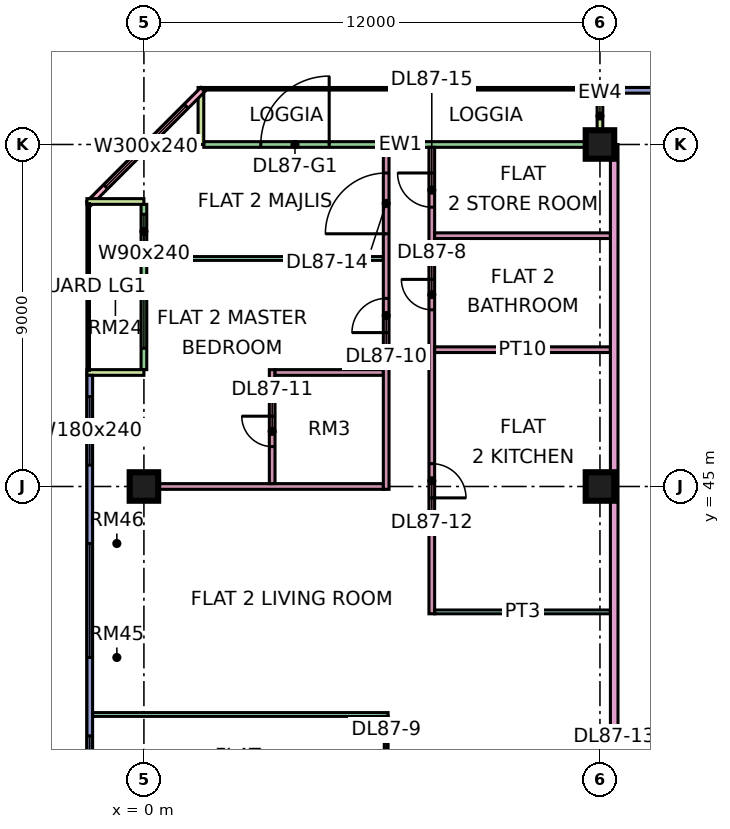
"""IFC4 building model, lengths in metres.
Left out: names, types, materials, properties, quantities, classifications, styles, units other than length and angle.
Written with IfcOpenShell. Run it as: python <this file> out.ifc"""

import sys

from ifc_helpers import new_model, si_unit, direction, frame, frame_2d, origin, origin_2d, place, context, subcontext, project, spatial, rectangle, extrude, element, fill, save


model = new_model("IFC4")
c1 = context("Model", 3, precision=1e-05, world=origin(), true_north=direction((0.0, 1.0)))
c2 = subcontext(c1, "Body", "Model", "MODEL_VIEW")
j1 = project(units=[si_unit("LENGTHUNIT", "METRE"), si_unit("PLANEANGLEUNIT", "RADIAN")], contexts=[c1])
p1 = place(None, origin())
s1 = spatial("IfcSite", under=j1, at=p1, CompositionType="ELEMENT")
p2 = place(p1, origin())
s2 = spatial("IfcBuilding", under=s1, at=p2, CompositionType="ELEMENT")
p3 = place(p2, frame((0.0, 0.0, 372.65)))
s3 = spatial("IfcBuildingStorey", under=s2, at=p3, CompositionType="ELEMENT", Elevation=372.65)
p4 = place(p3, frame((0.0, 45.0, 0.0), z_axis=(0.0, 0.0, 1.0), x_axis=(1.0, 0.0, 0.0)))
e1 = element("IfcColumn", 1, at=p4, inside=s3, PredefinedType="COLUMN", context=c2, shape_type="SweptSolid", body=[
    extrude(rectangle(XDim=0.75, YDim=0.75, at=origin_2d()), origin(), (0.0, 0.0, 1.0), 3.75),
])
for number, where, z_axis, x_axis in (
    (2, (12.0, 45.0, 0.0), (0.0, 0.0, 1.0), (1.0, 0.0, 0.0)),
    (3, (12.0, 54.0, 0.0), (0.0, 0.0, 1.0), (1.0, 0.0, 0.0)),
):
    element("IfcColumn", number, at=place(p3, frame(where, z_axis=z_axis, x_axis=x_axis)), inside=s3, PredefinedType="COLUMN", context=c2, shape_type="SweptSolid", body=[
        extrude(rectangle(XDim=0.75, YDim=0.75, at=origin_2d()), origin(), (0.0, 0.0, 1.0), 3.75),
    ])
p5 = place(p3, frame((22.5, 55.425, 0.0), z_axis=(0.0, 0.0, 1.0), x_axis=(-1.0, 0.0, 0.0)))
e4 = element("IfcWall", 4, at=p5, inside=s3, PredefinedType="SOLIDWALL", context=c2, shape_type="SweptSolid", body=[
    extrude(rectangle(XDim=10.425, YDim=0.15, at=frame_2d((5.212, 0.0))), origin(), (0.0, 0.0, 1.0), 3.35),
])
p6 = place(p5, frame((1.05, 0.0, 0.45)))
e5 = element("IfcOpeningElement", 5, at=p6, cuts=e4, PredefinedType="OPENING", context=c2, shape_type="SweptSolid", body=[
    extrude(rectangle(XDim=4.8, YDim=2.4, at=frame_2d((2.4, 1.2))), frame((0.0, 0.085, 0.0), z_axis=(0.0, -1.0, 0.0), x_axis=(1.0, 0.0, 0.0)), (0.0, 0.0, 1.0), 0.17),
])
p7 = place(p3, frame((11.925, 54.0, 0.0), z_axis=(0.0, 0.0, 1.0), x_axis=(-1.0, 0.0, 0.0)))
e6 = element("IfcWall", 6, at=p7, inside=s3, PredefinedType="SOLIDWALL", context=c2, shape_type="SweptSolid", body=[
    extrude(rectangle(XDim=10.35, YDim=0.15, at=frame_2d((5.175, 0.0))), origin(), (0.0, 0.0, 1.0), 3.35),
])
p8 = place(p7, frame((7.05, 0.0, 0.0)))
e7 = element("IfcOpeningElement", 7, at=p8, cuts=e6, PredefinedType="OPENING", context=c2, shape_type="SweptSolid", body=[
    extrude(rectangle(XDim=1.8, YDim=2.4, at=frame_2d((0.9, 1.2))), frame((0.0, 0.085, 0.0), z_axis=(0.0, -1.0, 0.0), x_axis=(1.0, 0.0, 0.0)), (0.0, 0.0, 1.0), 0.17),
])
for number, where, z_axis, x_axis in (
    (8, (12.0, 55.5, 0.0), (0.0, 0.0, 1.0), (0.0, -1.0, 0.0)),
    (9, (1.5, 55.5, 0.0), (0.0, 0.0, 1.0), (0.0, -1.0, 0.0)),
):
    element("IfcWall", number, at=place(p3, frame(where, z_axis=z_axis, x_axis=x_axis)), inside=s3, PredefinedType="SOLIDWALL", context=c2, shape_type="SweptSolid", body=[
        extrude(rectangle(XDim=1.5, YDim=0.15, at=frame_2d((0.75, 0.0))), origin(), (0.0, 0.0, 1.0), 3.35),
    ])
p9 = place(p3, frame((1.553, 55.447, 0.0), z_axis=(0.0, 0.0, 1.0), x_axis=(-0.707106781187, -0.707106781187, 0.0)))
e10 = element("IfcWall", 10, at=p9, inside=s3, PredefinedType="SOLIDWALL", context=c2, shape_type="SweptSolid", body=[
    extrude(rectangle(XDim=4.243, YDim=0.15, at=frame_2d((2.121, 0.0))), origin(), (0.0, 0.0, 1.0), 3.35),
])
p10 = place(p9, frame((0.621, 0.0, 0.45)))
e11 = element("IfcOpeningElement", 11, at=p10, cuts=e10, PredefinedType="OPENING", context=c2, shape_type="SweptSolid", body=[
    extrude(rectangle(XDim=3.0, YDim=2.4, at=frame_2d((1.5, 1.2))), frame((0.0, 0.085, 0.0), z_axis=(0.0, -1.0, 0.0), x_axis=(1.0, 0.0, 0.0)), (0.0, 0.0, 1.0), 0.17),
])
p11 = place(p3, frame((0.0, 52.425, 0.0), z_axis=(0.0, 0.0, 1.0), x_axis=(0.0, -1.0, 0.0)))
e12 = element("IfcWall", 12, at=p11, inside=s3, PredefinedType="SOLIDWALL", context=c2, shape_type="SweptSolid", body=[
    extrude(rectangle(XDim=4.35, YDim=0.15, at=frame_2d((2.175, 0.0))), origin(), (0.0, 0.0, 1.0), 3.35),
])
p12 = place(p11, frame((0.262, 0.0, 0.45)))
e13 = element("IfcOpeningElement", 13, at=p12, cuts=e12, PredefinedType="OPENING", context=c2, shape_type="SweptSolid", body=[
    extrude(rectangle(XDim=0.9, YDim=2.4, at=frame_2d((0.45, 1.2))), frame((0.0, 0.085, 0.0), z_axis=(0.0, -1.0, 0.0), x_axis=(1.0, 0.0, 0.0)), (0.0, 0.0, 1.0), 0.17),
])
p13 = place(p11, frame((1.988, 0.0, 0.45)))
e14 = element("IfcOpeningElement", 14, at=p13, cuts=e12, PredefinedType="OPENING", context=c2, shape_type="SweptSolid", body=[
    extrude(rectangle(XDim=1.8, YDim=2.4, at=frame_2d((0.9, 1.2))), frame((0.0, 0.085, 0.0), z_axis=(0.0, -1.0, 0.0), x_axis=(1.0, 0.0, 0.0)), (0.0, 0.0, 1.0), 0.17),
])
for number, where, z_axis, x_axis in (
    (15, (-1.5, 52.5, 0.0), (0.0, 0.0, 1.0), (1.0, 0.0, 0.0)),
    (16, (-1.5, 48.0, 0.0), (0.0, 0.0, 1.0), (1.0, 0.0, 0.0)),
):
    element("IfcWall", number, at=place(p3, frame(where, z_axis=z_axis, x_axis=x_axis)), inside=s3, PredefinedType="SOLIDWALL", context=c2, shape_type="SweptSolid", body=[
        extrude(rectangle(XDim=1.5, YDim=0.15, at=frame_2d((0.75, 0.0))), origin(), (0.0, 0.0, 1.0), 3.35),
    ])
p14 = place(p3, frame((-1.425, 47.925, 0.0), z_axis=(0.0, 0.0, 1.0), x_axis=(0.0, -1.0, 0.0)))
e17 = element("IfcWall", 17, at=p14, inside=s3, PredefinedType="SOLIDWALL", context=c2, shape_type="SweptSolid", body=[
    extrude(rectangle(XDim=11.85, YDim=0.15, at=frame_2d((5.925, 0.0))), origin(), (0.0, 0.0, 1.0), 3.35),
])
p15 = place(p14, frame((0.562, 0.0, 0.45)))
e18 = element("IfcOpeningElement", 18, at=p15, cuts=e17, PredefinedType="OPENING", context=c2, shape_type="SweptSolid", body=[
    extrude(rectangle(XDim=1.8, YDim=2.4, at=frame_2d((0.9, 1.2))), frame((0.0, 0.085, 0.0), z_axis=(0.0, -1.0, 0.0), x_axis=(1.0, 0.0, 0.0)), (0.0, 0.0, 1.0), 0.17),
])
p16 = place(p14, frame((4.425, 0.0, 0.45)))
e19 = element("IfcOpeningElement", 19, at=p16, cuts=e17, PredefinedType="OPENING", context=c2, shape_type="SweptSolid", body=[
    extrude(rectangle(XDim=3.0, YDim=2.4, at=frame_2d((1.5, 1.2))), frame((0.0, 0.085, 0.0), z_axis=(0.0, -1.0, 0.0), x_axis=(1.0, 0.0, 0.0)), (0.0, 0.0, 1.0), 0.17),
])
p17 = place(p14, frame((9.488, 0.0, 0.45)))
e20 = element("IfcOpeningElement", 20, at=p17, cuts=e17, PredefinedType="OPENING", context=c2, shape_type="SweptSolid", body=[
    extrude(rectangle(XDim=1.8, YDim=2.4, at=frame_2d((0.9, 1.2))), frame((0.0, 0.085, 0.0), z_axis=(0.0, -1.0, 0.0), x_axis=(1.0, 0.0, 0.0)), (0.0, 0.0, 1.0), 0.17),
])
p18 = place(p3, frame((-1.35, 39.0, 0.0), z_axis=(0.0, 0.0, 1.0), x_axis=(1.0, 0.0, 0.0)))
e21 = element("IfcWall", 21, at=p18, inside=s3, PredefinedType="PARTITIONING", context=c2, shape_type="SweptSolid", body=[
    extrude(rectangle(XDim=7.775, YDim=0.1, at=frame_2d((3.888, 0.0))), origin(), (0.0, 0.0, 1.0), 3.35),
])
e22 = element("IfcWall", 22, at=p4, inside=s3, PredefinedType="PARTITIONING", context=c2, shape_type="SweptSolid", body=[
    extrude(rectangle(XDim=6.3, YDim=0.15, at=frame_2d((3.15, 0.0))), origin(), (0.0, 0.0, 1.0), 3.35),
])
p19 = place(p3, frame((0.074, 51.0, 0.0), z_axis=(0.0, 0.0, 1.0), x_axis=(1.0, 0.0, 0.0)))
e23 = element("IfcWall", 23, at=p19, inside=s3, PredefinedType="PARTITIONING", context=c2, shape_type="SweptSolid", body=[
    extrude(rectangle(XDim=6.226, YDim=0.1, at=frame_2d((3.113, 0.0))), origin(), (0.0, 0.0, 1.0), 3.35),
])
p20 = place(p3, frame((3.375, 45.075, 0.0), z_axis=(0.0, 0.0, 1.0), x_axis=(0.0, 1.0, 0.0)))
e24 = element("IfcWall", 24, at=p20, inside=s3, PredefinedType="PARTITIONING", context=c2, shape_type="SweptSolid", body=[
    extrude(rectangle(XDim=3.0, YDim=0.15, at=frame_2d((1.5, 0.0))), origin(), (0.0, 0.0, 1.0), 3.35),
])
p21 = place(p20, frame((0.975, 0.0, 0.0)))
e25 = element("IfcOpeningElement", 25, at=p21, cuts=e24, PredefinedType="OPENING", context=c2, shape_type="SweptSolid", body=[
    extrude(rectangle(XDim=0.8, YDim=2.1, at=frame_2d((0.4, 1.05))), frame((0.0, 0.085, 0.0), z_axis=(0.0, -1.0, 0.0), x_axis=(1.0, 0.0, 0.0)), (0.0, 0.0, 1.0), 0.17),
])
p22 = place(p3, frame((3.45, 48.0, 0.0), z_axis=(0.0, 0.0, 1.0), x_axis=(1.0, 0.0, 0.0)))
e26 = element("IfcWall", 26, at=p22, inside=s3, PredefinedType="PARTITIONING", context=c2, shape_type="SweptSolid", body=[
    extrude(rectangle(XDim=2.85, YDim=0.15, at=frame_2d((1.425, 0.0))), origin(), (0.0, 0.0, 1.0), 3.35),
])
p23 = place(p3, frame((6.375, 36.1, 0.0), z_axis=(0.0, 0.0, 1.0), x_axis=(0.0, 1.0, 0.0)))
e27 = element("IfcWall", 27, at=p23, inside=s3, PredefinedType="PARTITIONING", context=c2, shape_type="SweptSolid", body=[
    extrude(rectangle(XDim=2.85, YDim=0.1, at=frame_2d((1.425, 0.0))), origin(), (0.0, 0.0, 1.0), 3.35),
])
p24 = place(p23, frame((0.95, 0.0, 0.0)))
e28 = element("IfcOpeningElement", 28, at=p24, cuts=e27, PredefinedType="OPENING", context=c2, shape_type="SweptSolid", body=[
    extrude(rectangle(XDim=0.9, YDim=2.1, at=frame_2d((0.45, 1.05))), frame((0.0, 0.06, 0.0), z_axis=(0.0, -1.0, 0.0), x_axis=(1.0, 0.0, 0.0)), (0.0, 0.0, 1.0), 0.12),
])
p25 = place(p3, frame((6.375, 44.925, 0.0), z_axis=(0.0, 0.0, 1.0), x_axis=(0.0, 1.0, 0.0)))
e29 = element("IfcWall", 29, at=p25, inside=s3, PredefinedType="PARTITIONING", context=c2, shape_type="SweptSolid", body=[
    extrude(rectangle(XDim=9.001, YDim=0.15, at=frame_2d((4.5, 0.0))), origin(), (0.0, 0.0, 1.0), 3.35),
])
p26 = place(p25, frame((4.125, 0.0, 0.0)))
e30 = element("IfcOpeningElement", 30, at=p26, cuts=e29, PredefinedType="OPENING", context=c2, shape_type="SweptSolid", body=[
    extrude(rectangle(XDim=0.9, YDim=2.1, at=frame_2d((0.45, 1.05))), frame((0.0, 0.085, 0.0), z_axis=(0.0, -1.0, 0.0), x_axis=(1.0, 0.0, 0.0)), (0.0, 0.0, 1.0), 0.17),
])
p27 = place(p25, frame((6.725, 0.0, 0.0)))
e31 = element("IfcOpeningElement", 31, at=p27, cuts=e29, PredefinedType="OPENING", context=c2, shape_type="SweptSolid", body=[
    extrude(rectangle(XDim=1.6, YDim=2.1, at=frame_2d((0.8, 1.05))), frame((0.0, 0.085, 0.0), z_axis=(0.0, -1.0, 0.0), x_axis=(1.0, 0.0, 0.0)), (0.0, 0.0, 1.0), 0.17),
])
p28 = place(p3, frame((7.575, 41.65, 0.0), z_axis=(0.0, 0.0, 1.0), x_axis=(0.0, 1.0, 0.0)))
e32 = element("IfcWall", 32, at=p28, inside=s3, PredefinedType="PARTITIONING", context=c2, shape_type="SweptSolid", body=[
    extrude(rectangle(XDim=12.276, YDim=0.15, at=frame_2d((6.138, 0.0))), origin(), (0.0, 0.0, 1.0), 3.35),
])
p29 = place(p28, frame((8.0, 0.0, 0.0)))
e33 = element("IfcOpeningElement", 33, at=p29, cuts=e32, PredefinedType="OPENING", context=c2, shape_type="SweptSolid", body=[
    extrude(rectangle(XDim=0.8, YDim=2.1, at=frame_2d((0.4, 1.05))), frame((0.0, 0.085, 0.0), z_axis=(0.0, -1.0, 0.0), x_axis=(1.0, 0.0, 0.0)), (0.0, 0.0, 1.0), 0.17),
])
p30 = place(p28, frame((3.05, 0.0, 0.0)))
e34 = element("IfcOpeningElement", 34, at=p30, cuts=e32, PredefinedType="OPENING", context=c2, shape_type="SweptSolid", body=[
    extrude(rectangle(XDim=0.9, YDim=2.1, at=frame_2d((0.45, 1.05))), frame((0.0, 0.085, 0.0), z_axis=(0.0, -1.0, 0.0), x_axis=(1.0, 0.0, 0.0)), (0.0, 0.0, 1.0), 0.17),
])
p31 = place(p28, frame((10.7, 0.0, 0.0)))
e35 = element("IfcOpeningElement", 35, at=p31, cuts=e32, PredefinedType="OPENING", context=c2, shape_type="SweptSolid", body=[
    extrude(rectangle(XDim=0.9, YDim=2.1, at=frame_2d((0.45, 1.05))), frame((0.0, 0.085, 0.0), z_axis=(0.0, -1.0, 0.0), x_axis=(1.0, 0.0, 0.0)), (0.0, 0.0, 1.0), 0.17),
])
p32 = place(p3, frame((7.65, 41.7, 0.0), z_axis=(0.0, 0.0, 1.0), x_axis=(1.0, 0.0, 0.0)))
e36 = element("IfcWall", 36, at=p32, inside=s3, PredefinedType="PARTITIONING", context=c2, shape_type="SweptSolid", body=[
    extrude(rectangle(XDim=4.625, YDim=0.1, at=frame_2d((2.312, 0.0))), origin(), (0.0, 0.0, 1.0), 3.35),
])
for number, where, z_axis, x_axis in (
    (37, (7.65, 48.6, 0.0), (0.0, 0.0, 1.0), (1.0, 0.0, 0.0)),
    (38, (7.65, 51.6, 0.0), (0.0, 0.0, 1.0), (1.0, 0.0, 0.0)),
):
    element("IfcWall", number, at=place(p3, frame(where, z_axis=z_axis, x_axis=x_axis)), inside=s3, PredefinedType="PARTITIONING", context=c2, shape_type="SweptSolid", body=[
        extrude(rectangle(XDim=4.625, YDim=0.15, at=frame_2d((2.312, 0.0))), origin(), (0.0, 0.0, 1.0), 3.35),
    ])
p33 = place(p3, frame((12.375, 20.0, 0.0), z_axis=(0.0, 0.0, 1.0), x_axis=(0.0, 1.0, 0.0)))
e39 = element("IfcWall", 39, at=p33, inside=s3, PredefinedType="PARTITIONING", context=c2, shape_type="SweptSolid", body=[
    extrude(rectangle(XDim=34.0, YDim=0.2, at=frame_2d((17.0, 0.0))), origin(), (0.0, 0.0, 1.0), 3.35),
])
p34 = place(p33, frame((16.8, 0.0, 0.0)))
e40 = element("IfcOpeningElement", 40, at=p34, cuts=e39, PredefinedType="OPENING", context=c2, shape_type="SweptSolid", body=[
    extrude(rectangle(XDim=1.0, YDim=2.1, at=frame_2d((0.5, 1.05))), frame((0.0, 0.11, 0.0), z_axis=(0.0, -1.0, 0.0), x_axis=(1.0, 0.0, 0.0)), (0.0, 0.0, 1.0), 0.22),
])
p35 = place(p33, frame((0.6, 0.0, 0.0)))
e41 = element("IfcOpeningElement", 41, at=p35, cuts=e39, PredefinedType="OPENING", context=c2, shape_type="SweptSolid", body=[
    extrude(rectangle(XDim=1.2, YDim=2.1, at=frame_2d((0.6, 1.05))), frame((0.0, 0.11, 0.0), z_axis=(0.0, -1.0, 0.0), x_axis=(1.0, 0.0, 0.0)), (0.0, 0.0, 1.0), 0.22),
])
p36 = place(p33, frame((4.5, 0.0, 0.0)))
e42 = element("IfcOpeningElement", 42, at=p36, cuts=e39, PredefinedType="OPENING", context=c2, shape_type="SweptSolid", body=[
    extrude(rectangle(XDim=1.0, YDim=2.1, at=frame_2d((0.5, 1.05))), frame((0.0, 0.11, 0.0), z_axis=(0.0, -1.0, 0.0), x_axis=(1.0, 0.0, 0.0)), (0.0, 0.0, 1.0), 0.22),
])
p37 = place(p8, frame((1.8, 0.0, 0.0), z_axis=(0.0, 0.0, 1.0), x_axis=(-1.0, 0.0, 0.0)))
e43 = element("IfcDoor", 43, at=p37, inside=s3, OperationType="DOUBLE_DOOR_SINGLE_SWING", PredefinedType="DOOR", context=c2, shape_type="SweptSolid", body=[
    extrude(rectangle(XDim=1.8, YDim=2.4, at=frame_2d((0.9, 1.2))), frame((0.0, 0.025, 0.0), z_axis=(0.0, -1.0, 0.0), x_axis=(1.0, 0.0, 0.0)), (0.0, 0.0, 1.0), 0.05),
])
fill(e7, e43)
p38 = place(p10, origin())
e44 = element("IfcWindow", 44, at=p38, inside=s3, PartitioningType="SINGLE_PANEL", PredefinedType="WINDOW", context=c2, shape_type="SweptSolid", body=[
    extrude(rectangle(XDim=3.0, YDim=2.4, at=frame_2d((1.5, 1.2))), frame((0.0, 0.03, 0.0), z_axis=(0.0, -1.0, 0.0), x_axis=(1.0, 0.0, 0.0)), (0.0, 0.0, 1.0), 0.06),
])
fill(e11, e44)
p39 = place(p12, origin())
e45 = element("IfcWindow", 45, at=p39, inside=s3, PartitioningType="SINGLE_PANEL", PredefinedType="WINDOW", context=c2, shape_type="SweptSolid", body=[
    extrude(rectangle(XDim=0.9, YDim=2.4, at=frame_2d((0.45, 1.2))), frame((0.0, 0.03, 0.0), z_axis=(0.0, -1.0, 0.0), x_axis=(1.0, 0.0, 0.0)), (0.0, 0.0, 1.0), 0.06),
])
fill(e13, e45)
p40 = place(p13, origin())
e46 = element("IfcWindow", 46, at=p40, inside=s3, PartitioningType="SINGLE_PANEL", PredefinedType="WINDOW", context=c2, shape_type="SweptSolid", body=[
    extrude(rectangle(XDim=1.8, YDim=2.4, at=frame_2d((0.9, 1.2))), frame((0.0, 0.03, 0.0), z_axis=(0.0, -1.0, 0.0), x_axis=(1.0, 0.0, 0.0)), (0.0, 0.0, 1.0), 0.06),
])
fill(e14, e46)
p41 = place(p15, origin())
e47 = element("IfcWindow", 47, at=p41, inside=s3, PartitioningType="SINGLE_PANEL", PredefinedType="WINDOW", context=c2, shape_type="SweptSolid", body=[
    extrude(rectangle(XDim=1.8, YDim=2.4, at=frame_2d((0.9, 1.2))), frame((0.0, 0.03, 0.0), z_axis=(0.0, -1.0, 0.0), x_axis=(1.0, 0.0, 0.0)), (0.0, 0.0, 1.0), 0.06),
])
fill(e18, e47)
p42 = place(p16, origin())
e48 = element("IfcWindow", 48, at=p42, inside=s3, PartitioningType="SINGLE_PANEL", PredefinedType="WINDOW", context=c2, shape_type="SweptSolid", body=[
    extrude(rectangle(XDim=3.0, YDim=2.4, at=frame_2d((1.5, 1.2))), frame((0.0, 0.03, 0.0), z_axis=(0.0, -1.0, 0.0), x_axis=(1.0, 0.0, 0.0)), (0.0, 0.0, 1.0), 0.06),
])
fill(e19, e48)
p43 = place(p17, origin())
e49 = element("IfcWindow", 49, at=p43, inside=s3, PartitioningType="SINGLE_PANEL", PredefinedType="WINDOW", context=c2, shape_type="SweptSolid", body=[
    extrude(rectangle(XDim=1.8, YDim=2.4, at=frame_2d((0.9, 1.2))), frame((0.0, 0.03, 0.0), z_axis=(0.0, -1.0, 0.0), x_axis=(1.0, 0.0, 0.0)), (0.0, 0.0, 1.0), 0.06),
])
fill(e20, e49)
p44 = place(p29, frame((0.8, 0.0, 0.0), z_axis=(0.0, 0.0, 1.0), x_axis=(-1.0, 0.0, 0.0)))
e50 = element("IfcDoor", 50, at=p44, inside=s3, OperationType="SINGLE_SWING_RIGHT", PredefinedType="DOOR", context=c2, shape_type="SweptSolid", body=[
    extrude(rectangle(XDim=0.8, YDim=2.1, at=frame_2d((0.4, 1.05))), frame((0.0, 0.025, 0.0), z_axis=(0.0, -1.0, 0.0), x_axis=(1.0, 0.0, 0.0)), (0.0, 0.0, 1.0), 0.05),
])
fill(e33, e50)
p45 = place(p26, origin())
e51 = element("IfcDoor", 51, at=p45, inside=s3, OperationType="SINGLE_SWING_LEFT", PredefinedType="DOOR", context=c2, shape_type="SweptSolid", body=[
    extrude(rectangle(XDim=0.9, YDim=2.1, at=frame_2d((0.45, 1.05))), frame((0.0, 0.025, 0.0), z_axis=(0.0, -1.0, 0.0), x_axis=(1.0, 0.0, 0.0)), (0.0, 0.0, 1.0), 0.05),
])
fill(e30, e51)
p46 = place(p21, frame((0.8, 0.0, 0.0), z_axis=(0.0, 0.0, 1.0), x_axis=(-1.0, 0.0, 0.0)))
e52 = element("IfcDoor", 52, at=p46, inside=s3, OperationType="SINGLE_SWING_RIGHT", PredefinedType="DOOR", context=c2, shape_type="SweptSolid", body=[
    extrude(rectangle(XDim=0.8, YDim=2.1, at=frame_2d((0.4, 1.05))), frame((0.0, 0.025, 0.0), z_axis=(0.0, -1.0, 0.0), x_axis=(1.0, 0.0, 0.0)), (0.0, 0.0, 1.0), 0.05),
])
fill(e25, e52)
p47 = place(p30, frame((0.9, 0.0, 0.0), z_axis=(0.0, 0.0, 1.0), x_axis=(-1.0, 0.0, 0.0)))
e53 = element("IfcDoor", 53, at=p47, inside=s3, OperationType="SINGLE_SWING_LEFT", PredefinedType="DOOR", context=c2, shape_type="SweptSolid", body=[
    extrude(rectangle(XDim=0.9, YDim=2.1, at=frame_2d((0.45, 1.05))), frame((0.0, 0.025, 0.0), z_axis=(0.0, -1.0, 0.0), x_axis=(1.0, 0.0, 0.0)), (0.0, 0.0, 1.0), 0.05),
])
fill(e34, e53)
p48 = place(p27, origin())
e54 = element("IfcDoor", 54, at=p48, inside=s3, OperationType="DOUBLE_DOOR_SINGLE_SWING", PredefinedType="DOOR", context=c2, shape_type="SweptSolid", body=[
    extrude(rectangle(XDim=1.6, YDim=2.1, at=frame_2d((0.8, 1.05))), frame((0.0, 0.025, 0.0), z_axis=(0.0, -1.0, 0.0), x_axis=(1.0, 0.0, 0.0)), (0.0, 0.0, 1.0), 0.05),
])
fill(e31, e54)
p49 = place(p31, frame((0.9, 0.0, 0.0), z_axis=(0.0, 0.0, 1.0), x_axis=(-1.0, 0.0, 0.0)))
e55 = element("IfcDoor", 55, at=p49, inside=s3, OperationType="SINGLE_SWING_RIGHT", PredefinedType="DOOR", context=c2, shape_type="SweptSolid", body=[
    extrude(rectangle(XDim=0.9, YDim=2.1, at=frame_2d((0.45, 1.05))), frame((0.0, 0.025, 0.0), z_axis=(0.0, -1.0, 0.0), x_axis=(1.0, 0.0, 0.0)), (0.0, 0.0, 1.0), 0.05),
])
fill(e35, e55)
save(model, sys.argv[1])
